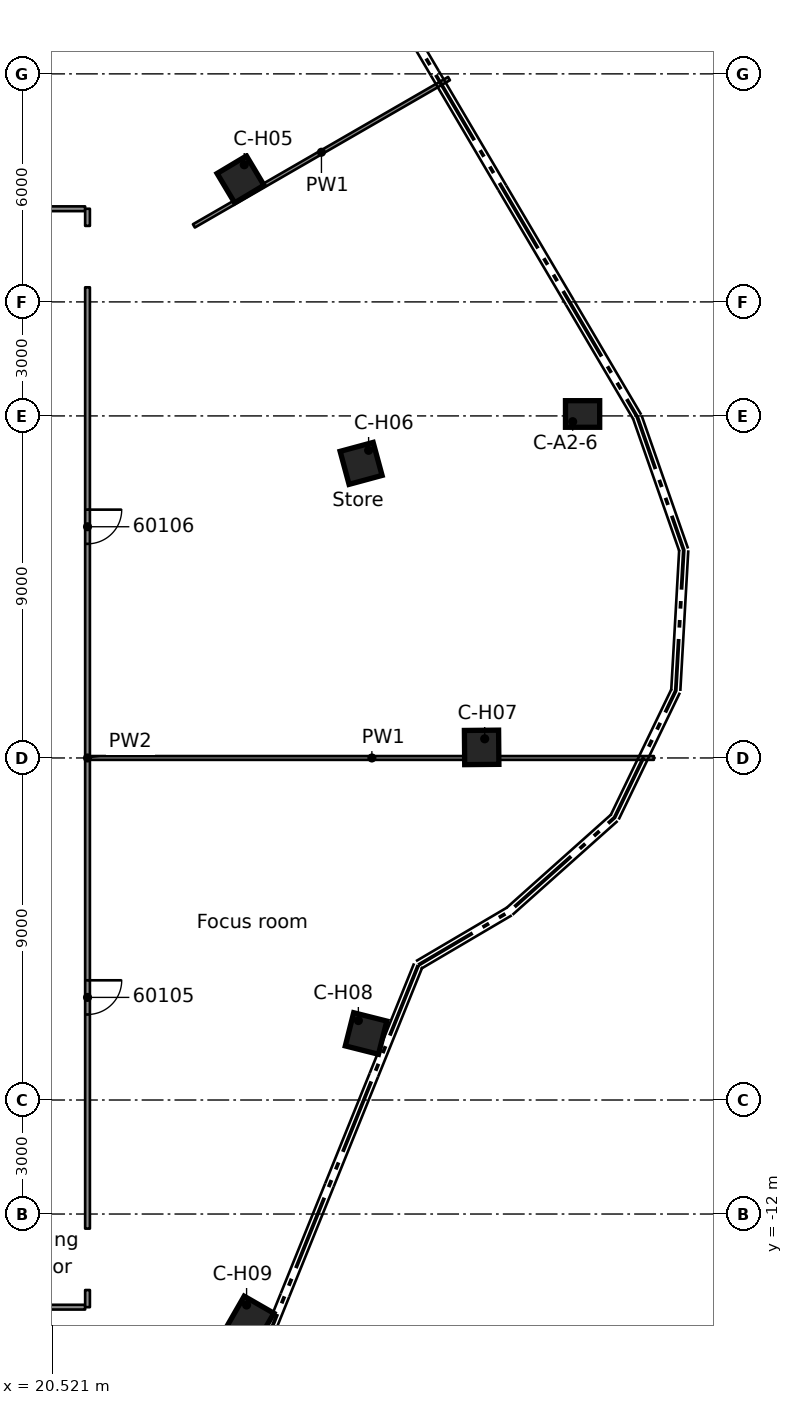
"""IFC4 building model, lengths in metres.
Left out: names, types, materials, properties, quantities, classifications, styles, units other than length and angle.
Written with IfcOpenShell. Run it as: python <this file> out.ifc"""

import sys

from ifc_helpers import new_model, si_unit, direction, frame, frame_2d, origin, origin_2d, place, context, subcontext, project, spatial, rectangle, extrude, element, fill, save


model = new_model("IFC4")
c1 = context("Model", 3, precision=1e-05, world=origin(), true_north=direction((0.0, 1.0)))
c2 = subcontext(c1, "Body", "Model", "MODEL_VIEW")
j1 = project(units=[si_unit("LENGTHUNIT", "METRE"), si_unit("PLANEANGLEUNIT", "RADIAN")], contexts=[c1])
p1 = place(None, origin())
s1 = spatial("IfcSite", under=j1, at=p1, CompositionType="ELEMENT")
p2 = place(p1, origin())
s2 = spatial("IfcBuilding", under=s1, at=p2, CompositionType="ELEMENT")
p3 = place(p2, frame((0.0, 0.0, 292.9)))
s3 = spatial("IfcBuildingStorey", under=s2, at=p3, CompositionType="ELEMENT", Elevation=292.9)
p4 = place(p3, frame((34.477, 9.051, 0.0), z_axis=(0.0, 0.0, 1.0), x_axis=(1.0, 0.0, 0.0)))
e1 = element("IfcColumn", 1, at=p4, inside=s3, PredefinedType="COLUMN", context=c2, shape_type="SweptSolid", body=[
    extrude(rectangle(XDim=0.9, YDim=0.7, at=origin_2d()), origin(), (0.0, 0.0, 1.0), 3.5),
])
for number, where, z_axis, x_axis in (
    (2, (25.477, 15.224, 0.0), (0.0, 0.0, 1.0), (0.858, 0.513, 0.0)),
    (3, (28.649, 7.751, 0.0), (0.0, 0.0, 1.0), (0.965, 0.261, 0.0)),
    (4, (31.821, 0.278, 0.0), (0.0, 0.0, 1.0), (1.0, 0.009, 0.0)),
    (5, (28.78, -7.25, 0.0), (0.0, 0.0, 1.0), (0.97, -0.244, 0.0)),
    (6, (25.739, -14.777, 0.0), (0.0, 0.0, 1.0), (0.867, -0.498, 0.0)),
):
    element("IfcColumn", number, at=place(p3, frame(where, z_axis=z_axis, x_axis=x_axis)), inside=s3, PredefinedType="COLUMN", context=c2, shape_type="SweptSolid", body=[
        extrude(rectangle(XDim=0.9, YDim=0.9, at=origin_2d()), origin(), (0.0, 0.0, 1.0), 3.5),
    ])
p5 = place(p3, frame((21.387, -14.451, 0.0), z_axis=(0.0, 0.0, 1.0), x_axis=(-1.0, 0.0, 0.0)))
e7 = element("IfcWall", 7, at=p5, inside=s3, PredefinedType="PARTITIONING", context=c2, shape_type="SweptSolid", body=[
    extrude(rectangle(XDim=10.996, YDim=0.125, at=frame_2d((5.498, 0.0))), origin(), (0.0, 0.0, 1.0), 3.08),
])
p6 = place(p5, frame((5.038, 0.0, 0.0)))
e8 = element("IfcOpeningElement", 8, at=p6, cuts=e7, PredefinedType="OPENING", context=c2, shape_type="SweptSolid", body=[
    extrude(rectangle(XDim=0.9, YDim=2.1, at=frame_2d((0.45, 1.05))), frame((0.0, 0.073, 0.0), z_axis=(0.0, -1.0, 0.0), x_axis=(1.0, 0.0, 0.0)), (0.0, 0.0, 1.0), 0.145),
])
p7 = place(p3, frame((21.512, 0.0, 0.0), z_axis=(0.0, 0.0, 1.0), x_axis=(1.0, 0.0, 0.0)))
e9 = element("IfcWall", 9, at=p7, inside=s3, PredefinedType="PARTITIONING", context=c2, shape_type="SweptSolid", body=[
    extrude(rectangle(XDim=14.841, YDim=0.1, at=frame_2d((7.42, 0.0))), origin(), (0.0, 0.0, 1.0), 3.08),
])
p8 = place(p3, frame((10.35, 14.451, 0.0), z_axis=(0.0, 0.0, 1.0), x_axis=(1.0, 0.0, 0.0)))
e10 = element("IfcWall", 10, at=p8, inside=s3, PredefinedType="PARTITIONING", context=c2, shape_type="SweptSolid", body=[
    extrude(rectangle(XDim=11.037, YDim=0.125, at=frame_2d((5.519, 0.0))), origin(), (0.0, 0.0, 1.0), 3.08),
])
p9 = place(p8, frame((4.6, 0.0, 0.0)))
e11 = element("IfcOpeningElement", 11, at=p9, cuts=e10, PredefinedType="OPENING", context=c2, shape_type="SweptSolid", body=[
    extrude(rectangle(XDim=1.8, YDim=2.1, at=frame_2d((0.9, 1.05))), frame((0.0, 0.073, 0.0), z_axis=(0.0, -1.0, 0.0), x_axis=(1.0, 0.0, 0.0)), (0.0, 0.0, 1.0), 0.145),
])
p10 = place(p3, frame((24.249, 14.0, 0.0), z_axis=(0.0, 0.0, 1.0), x_axis=(0.866009351323, 0.500027802648, 0.0)))
e12 = element("IfcWall", 12, at=p10, inside=s3, PredefinedType="PARTITIONING", context=c2, shape_type="SweptSolid", body=[
    extrude(rectangle(XDim=7.751, YDim=0.1, at=frame_2d((3.876, 0.0))), origin(), (0.0, 0.0, 1.0), 3.08),
])
p11 = place(p3, frame((21.45, -14.451, 0.0), z_axis=(0.0, 0.0, 1.0), x_axis=(0.0, 1.0, 0.0)))
e13 = element("IfcWall", 13, at=p11, inside=s3, PredefinedType="PARTITIONING", context=c2, shape_type="SweptSolid", body=[
    extrude(rectangle(XDim=0.451, YDim=0.125, at=frame_2d((0.226, 0.0))), origin(), (0.0, 0.0, 1.0), 3.08),
])
p12 = place(p3, frame((21.45, 12.384, 0.0), z_axis=(0.0, 0.0, 1.0), x_axis=(0.0, -1.0, 0.0)))
e14 = element("IfcWall", 14, at=p12, inside=s3, PredefinedType="PARTITIONING", context=c2, shape_type="SweptSolid", body=[
    extrude(rectangle(XDim=24.768, YDim=0.125, at=frame_2d((12.384, 0.0))), origin(), (0.0, 0.0, 1.0), 3.08),
])
p13 = place(p12, frame((18.234, 0.0, 0.0)))
e15 = element("IfcOpeningElement", 15, at=p13, cuts=e14, PredefinedType="OPENING", context=c2, shape_type="SweptSolid", body=[
    extrude(rectangle(XDim=0.9, YDim=2.1, at=frame_2d((0.45, 1.05))), frame((0.0, 0.073, 0.0), z_axis=(0.0, -1.0, 0.0), x_axis=(1.0, 0.0, 0.0)), (0.0, 0.0, 1.0), 0.145),
])
p14 = place(p12, frame((5.85, 0.0, 0.0)))
e16 = element("IfcOpeningElement", 16, at=p14, cuts=e14, PredefinedType="OPENING", context=c2, shape_type="SweptSolid", body=[
    extrude(rectangle(XDim=0.9, YDim=2.1, at=frame_2d((0.45, 1.05))), frame((0.0, 0.073, 0.0), z_axis=(0.0, -1.0, 0.0), x_axis=(1.0, 0.0, 0.0)), (0.0, 0.0, 1.0), 0.145),
])
p15 = place(p3, frame((21.45, 14.0, 0.0), z_axis=(0.0, 0.0, 1.0), x_axis=(0.0, 1.0, 0.0)))
e17 = element("IfcWall", 17, at=p15, inside=s3, PredefinedType="PARTITIONING", context=c2, shape_type="SweptSolid", body=[
    extrude(rectangle(XDim=0.451, YDim=0.125, at=frame_2d((0.226, 0.0))), origin(), (0.0, 0.0, 1.0), 3.08),
])
p16 = place(p13, origin())
e18 = element("IfcDoor", 18, at=p16, inside=s3, OperationType="SINGLE_SWING_RIGHT", PredefinedType="DOOR", context=c2, shape_type="SweptSolid", body=[
    extrude(rectangle(XDim=0.9, YDim=2.1, at=frame_2d((0.45, 1.05))), frame((0.0, 0.025, 0.0), z_axis=(0.0, -1.0, 0.0), x_axis=(1.0, 0.0, 0.0)), (0.0, 0.0, 1.0), 0.05),
])
fill(e15, e18)
p17 = place(p14, origin())
e19 = element("IfcDoor", 19, at=p17, inside=s3, OperationType="SINGLE_SWING_LEFT", PredefinedType="DOOR", context=c2, shape_type="SweptSolid", body=[
    extrude(rectangle(XDim=0.9, YDim=2.1, at=frame_2d((0.45, 1.05))), frame((0.0, 0.025, 0.0), z_axis=(0.0, -1.0, 0.0), x_axis=(1.0, 0.0, 0.0)), (0.0, 0.0, 1.0), 0.05),
])
fill(e16, e19)
save(model, sys.argv[1])
